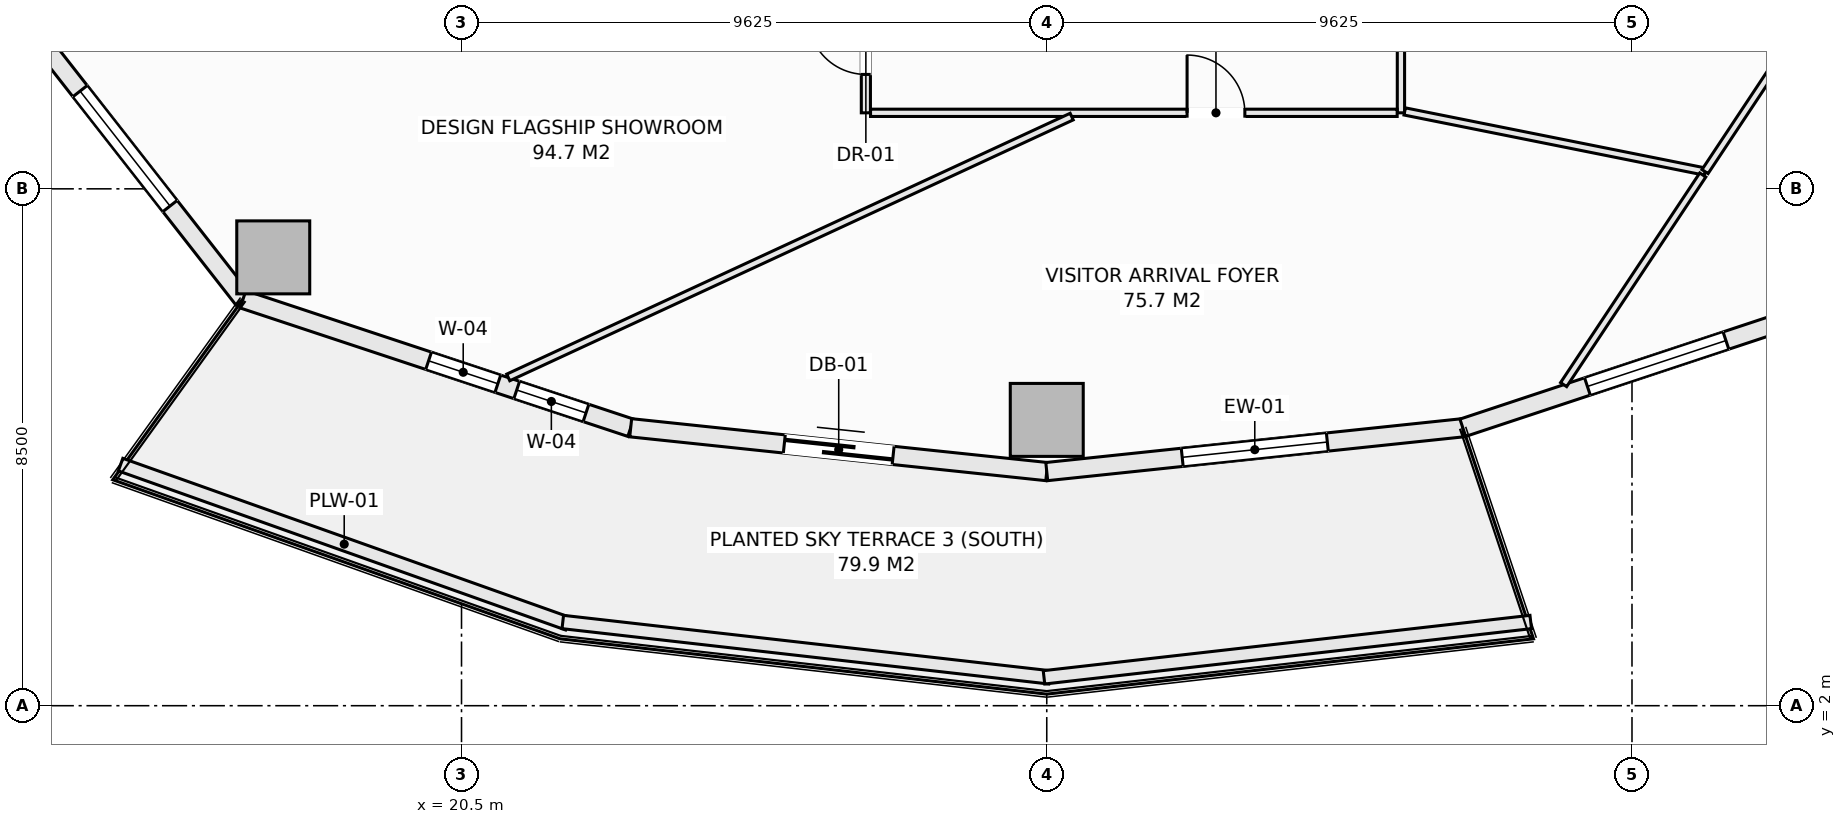
"""IFC4 building model, lengths in metres.
Left out: names, types, materials, properties, quantities, classifications, styles, units other than length and angle.
Written with IfcOpenShell. Run it as: python <this file> out.ifc"""

import sys

from ifc_helpers import new_model, si_unit, direction, frame, frame_2d, origin, origin_2d, place, context, subcontext, project, spatial, rectangle, extrude, element, fill, save


model = new_model("IFC4")
c1 = context("Model", 3, precision=1e-05, world=origin(), true_north=direction((0.0, 1.0)))
c2 = subcontext(c1, "Body", "Model", "MODEL_VIEW")
j1 = project(units=[si_unit("LENGTHUNIT", "METRE"), si_unit("PLANEANGLEUNIT", "RADIAN")], contexts=[c1])
p1 = place(None, origin())
s1 = spatial("IfcSite", under=j1, at=p1, CompositionType="ELEMENT")
p2 = place(p1, origin())
s2 = spatial("IfcBuilding", under=s1, at=p2, CompositionType="ELEMENT")
p3 = place(p2, frame((0.0, 0.0, 57.3)))
s3 = spatial("IfcBuildingStorey", under=s2, at=p3, CompositionType="ELEMENT", Elevation=57.3)
for number, where, z_axis, x_axis in (
    (1, (17.404, 9.373, -0.28), (0.0, 0.0, 1.0), (1.0, 0.0, 0.0)),
    (2, (30.125, 6.7, -0.28), (0.0, 0.0, 1.0), (1.0, 0.0, 0.0)),
):
    element("IfcColumn", number, at=place(p3, frame(where, z_axis=z_axis, x_axis=x_axis)), inside=s3, PredefinedType="COLUMN", context=c2, shape_type="SweptSolid", body=[
        extrude(rectangle(XDim=1.2, YDim=1.2, at=origin_2d()), origin(), (0.0, 0.0, 1.0), 3.85),
    ])
p4 = place(p3, frame((13.026, 13.64, 0.0), z_axis=(0.0, 0.0, 1.0), x_axis=(0.616434798832, -0.78740595552, 0.0)))
e3 = element("IfcWall", 3, at=p4, inside=s3, PredefinedType="SOLIDWALL", context=c2, shape_type="SweptSolid", body=[
    extrude(rectangle(XDim=6.294, YDim=0.3, at=frame_2d((3.147, 0.0))), origin(), (0.0, 0.0, 1.0), 3.093),
])
p5 = place(p4, frame((1.947, 0.0, 0.85)))
e4 = element("IfcOpeningElement", 4, at=p5, cuts=e3, PredefinedType="OPENING", context=c2, shape_type="SweptSolid", body=[
    extrude(rectangle(XDim=2.4, YDim=1.9, at=frame_2d((1.2, 0.95))), frame((0.0, 0.16, 0.0), z_axis=(0.0, -1.0, 0.0), x_axis=(1.0, 0.0, 0.0)), (0.0, 0.0, 1.0), 0.32),
])
p6 = place(p3, frame((16.906, 8.684, 0.0), z_axis=(0.0, 0.0, 1.0), x_axis=(0.949245153629, -0.314537181127, 0.0)))
e5 = element("IfcWall", 5, at=p6, inside=s3, PredefinedType="SOLIDWALL", context=c2, shape_type="SweptSolid", body=[
    extrude(rectangle(XDim=6.717, YDim=0.3, at=frame_2d((3.358, 0.0))), origin(), (0.0, 0.0, 1.0), 3.093),
])
p7 = place(p6, frame((3.215, 0.0, 0.85)))
e6 = element("IfcOpeningElement", 6, at=p7, cuts=e5, PredefinedType="OPENING", context=c2, shape_type="SweptSolid", body=[
    extrude(rectangle(XDim=1.2, YDim=1.9, at=frame_2d((0.6, 0.95))), frame((0.0, 0.16, 0.0), z_axis=(0.0, -1.0, 0.0), x_axis=(1.0, 0.0, 0.0)), (0.0, 0.0, 1.0), 0.32),
])
p8 = place(p6, frame((4.742, 0.0, 0.85)))
e7 = element("IfcOpeningElement", 7, at=p8, cuts=e5, PredefinedType="OPENING", context=c2, shape_type="SweptSolid", body=[
    extrude(rectangle(XDim=1.2, YDim=1.9, at=frame_2d((0.6, 0.95))), frame((0.0, 0.16, 0.0), z_axis=(0.0, -1.0, 0.0), x_axis=(1.0, 0.0, 0.0)), (0.0, 0.0, 1.0), 0.32),
])
p9 = place(p3, frame((23.282, 6.571, 0.0), z_axis=(0.0, 0.0, 1.0), x_axis=(0.994498840295, -0.104747585419, 0.0)))
e8 = element("IfcWall", 8, at=p9, inside=s3, PredefinedType="SOLIDWALL", context=c2, shape_type="SweptSolid", body=[
    extrude(rectangle(XDim=6.88, YDim=0.3, at=frame_2d((3.44, 0.0))), origin(), (0.0, 0.0, 1.0), 3.093),
])
p10 = place(p9, frame((2.54, 0.0, 0.0)))
e9 = element("IfcOpeningElement", 9, at=p10, cuts=e8, PredefinedType="OPENING", context=c2, shape_type="SweptSolid", body=[
    extrude(rectangle(XDim=1.8, YDim=2.25, at=frame_2d((0.9, 1.125))), frame((0.0, 0.16, 0.0), z_axis=(0.0, -1.0, 0.0), x_axis=(1.0, 0.0, 0.0)), (0.0, 0.0, 1.0), 0.32),
])
p11 = place(p3, frame((30.125, 5.85, 0.0), z_axis=(0.0, 0.0, 1.0), x_axis=(0.994498840295, 0.104747585419, 0.0)))
e10 = element("IfcWall", 10, at=p11, inside=s3, PredefinedType="SOLIDWALL", context=c2, shape_type="SweptSolid", body=[
    extrude(rectangle(XDim=6.88, YDim=0.3, at=frame_2d((3.44, 0.0))), origin(), (0.0, 0.0, 1.0), 3.093),
])
p12 = place(p11, frame((2.24, 0.0, 0.85)))
e11 = element("IfcOpeningElement", 11, at=p12, cuts=e10, PredefinedType="OPENING", context=c2, shape_type="SweptSolid", body=[
    extrude(rectangle(XDim=2.4, YDim=1.9, at=frame_2d((1.2, 0.95))), frame((0.0, 0.16, 0.0), z_axis=(0.0, -1.0, 0.0), x_axis=(1.0, 0.0, 0.0)), (0.0, 0.0, 1.0), 0.32),
])
p13 = place(p3, frame((36.968, 6.571, 0.0), z_axis=(0.0, 0.0, 1.0), x_axis=(0.949245153629, 0.314537181127, 0.0)))
e12 = element("IfcWall", 12, at=p13, inside=s3, PredefinedType="SOLIDWALL", context=c2, shape_type="SweptSolid", body=[
    extrude(rectangle(XDim=6.717, YDim=0.3, at=frame_2d((3.358, 0.0))), origin(), (0.0, 0.0, 1.0), 3.093),
])
p14 = place(p13, frame((2.159, 0.0, 0.85)))
e13 = element("IfcOpeningElement", 13, at=p14, cuts=e12, PredefinedType="OPENING", context=c2, shape_type="SweptSolid", body=[
    extrude(rectangle(XDim=2.4, YDim=1.9, at=frame_2d((1.2, 0.95))), frame((0.0, 0.16, 0.0), z_axis=(0.0, -1.0, 0.0), x_axis=(1.0, 0.0, 0.0)), (0.0, 0.0, 1.0), 0.32),
])
p15 = place(p3, frame((14.893, 5.965, 0.0), z_axis=(0.0, 0.0, 1.0), x_axis=(0.942203722205, -0.335040513764, 0.0)))
e14 = element("IfcWall", 14, at=p15, inside=s3, PredefinedType="PARAPET", context=c2, shape_type="SweptSolid", body=[
    extrude(rectangle(XDim=7.807, YDim=0.22, at=frame_2d((3.904, 0.0))), origin(), (0.0, 0.0, 1.0), 0.52),
])
for number, where, z_axis, x_axis in (
    (15, (22.166, 3.376, 0.0), (0.0, 0.0, 1.0), (0.994, -0.113, 0.0)),
    (16, (30.08, 2.466, 0.0), (0.0, 0.0, 1.0), (0.994, 0.113, 0.0)),
):
    element("IfcWall", number, at=place(p3, frame(where, z_axis=z_axis, x_axis=x_axis)), inside=s3, PredefinedType="PARAPET", context=c2, shape_type="SweptSolid", body=[
        extrude(rectangle(XDim=8.056, YDim=0.22, at=frame_2d((4.028, 0.0))), origin(), (0.0, 0.0, 1.0), 0.52),
    ])
p16 = place(p3, frame((27.15, 11.75, 0.0), z_axis=(0.0, 0.0, 1.0), x_axis=(0.0, 1.0, 0.0)))
e17 = element("IfcWall", 17, at=p16, inside=s3, PredefinedType="PARTITIONING", context=c2, shape_type="SweptSolid", body=[
    extrude(rectangle(XDim=5.223, YDim=0.15, at=frame_2d((2.611, 0.0))), origin(), (0.0, 0.0, 1.0), 3.57),
])
p17 = place(p16, frame((0.631, 0.0, 0.0)))
e18 = element("IfcOpeningElement", 18, at=p17, cuts=e17, PredefinedType="OPENING", context=c2, shape_type="SweptSolid", body=[
    extrude(rectangle(XDim=0.95, YDim=2.1, at=frame_2d((0.475, 1.05))), frame((0.0, 0.085, 0.0), z_axis=(0.0, -1.0, 0.0), x_axis=(1.0, 0.0, 0.0)), (0.0, 0.0, 1.0), 0.17),
])
p18 = place(p16, frame((2.828, 0.0, 0.0)))
e19 = element("IfcOpeningElement", 19, at=p18, cuts=e17, PredefinedType="OPENING", context=c2, shape_type="SweptSolid", body=[
    extrude(rectangle(XDim=0.95, YDim=2.1, at=frame_2d((0.475, 1.05))), frame((0.0, 0.085, 0.0), z_axis=(0.0, -1.0, 0.0), x_axis=(1.0, 0.0, 0.0)), (0.0, 0.0, 1.0), 0.17),
])
p19 = place(p3, frame((35.95, 11.75, 0.0), z_axis=(0.0, 0.0, 1.0), x_axis=(0.0, 1.0, 0.0)))
e20 = element("IfcWall", 20, at=p19, inside=s3, PredefinedType="PARTITIONING", context=c2, shape_type="SweptSolid", body=[
    extrude(rectangle(XDim=3.838, YDim=0.12, at=frame_2d((1.919, 0.0))), origin(), (0.0, 0.0, 1.0), 3.57),
])
p20 = place(p3, frame((27.227, 11.75, 0.0), z_axis=(0.0, 0.0, 1.0), x_axis=(1.0, 0.0, 0.0)))
e21 = element("IfcWall", 21, at=p20, inside=s3, PredefinedType="PARTITIONING", context=c2, shape_type="SweptSolid", body=[
    extrude(rectangle(XDim=8.661, YDim=0.12, at=frame_2d((4.331, 0.0))), origin(), (0.0, 0.0, 1.0), 3.57),
])
p21 = place(p20, frame((5.206, 0.0, 0.0)))
e22 = element("IfcOpeningElement", 22, at=p21, cuts=e21, PredefinedType="OPENING", context=c2, shape_type="SweptSolid", body=[
    extrude(rectangle(XDim=0.95, YDim=2.1, at=frame_2d((0.475, 1.05))), frame((0.0, 0.07, 0.0), z_axis=(0.0, -1.0, 0.0), x_axis=(1.0, 0.0, 0.0)), (0.0, 0.0, 1.0), 0.14),
])
p22 = place(p3, frame((36.012, 11.773, 0.0), z_axis=(0.0, 0.0, 1.0), x_axis=(0.980526579604, -0.196386421855, 0.0)))
e23 = element("IfcWall", 23, at=p22, inside=s3, PredefinedType="PARTITIONING", context=c2, shape_type="SweptSolid", body=[
    extrude(rectangle(XDim=5.037, YDim=0.12, at=frame_2d((2.519, 0.0))), origin(), (0.0, 0.0, 1.0), 3.57),
])
p23 = place(p3, frame((21.269, 7.398, 0.0), z_axis=(0.0, 0.0, 1.0), x_axis=(0.907478047532, 0.420099503983, 0.0)))
e24 = element("IfcWall", 24, at=p23, inside=s3, PredefinedType="PARTITIONING", context=c2, shape_type="SweptSolid", body=[
    extrude(rectangle(XDim=10.211, YDim=0.12, at=frame_2d((5.106, 0.0))), origin(), (0.0, 0.0, 1.0), 3.093),
])
p24 = place(p3, frame((38.625, 7.28, 0.0), z_axis=(0.0, 0.0, 1.0), x_axis=(0.553106233715, 0.833110733471, 0.0)))
e25 = element("IfcWall", 25, at=p24, inside=s3, PredefinedType="PARTITIONING", context=c2, shape_type="SweptSolid", body=[
    extrude(rectangle(XDim=4.138, YDim=0.12, at=frame_2d((2.069, 0.0))), origin(), (0.0, 0.0, 1.0), 3.57),
])
p25 = place(p3, frame((40.951, 10.783, 0.0), z_axis=(0.0, 0.0, 1.0), x_axis=(0.553122636923, 0.83309984307, 0.0)))
e26 = element("IfcWall", 26, at=p25, inside=s3, PredefinedType="PARTITIONING", context=c2, shape_type="SweptSolid", body=[
    extrude(rectangle(XDim=9.72, YDim=0.12, at=frame_2d((4.86, 0.0))), origin(), (0.0, 0.0, 1.0), 3.57),
])
p26 = place(p5, origin())
e27 = element("IfcWindow", 27, at=p26, inside=s3, PartitioningType="SINGLE_PANEL", PredefinedType="WINDOW", context=c2, shape_type="SweptSolid", body=[
    extrude(rectangle(XDim=2.4, YDim=1.9, at=frame_2d((1.2, 0.95))), frame((0.0, 0.03, 0.0), z_axis=(0.0, -1.0, 0.0), x_axis=(1.0, 0.0, 0.0)), (0.0, 0.0, 1.0), 0.06),
])
fill(e4, e27)
p27 = place(p7, origin())
e28 = element("IfcWindow", 28, at=p27, inside=s3, PartitioningType="SINGLE_PANEL", PredefinedType="WINDOW", context=c2, shape_type="SweptSolid", body=[
    extrude(rectangle(XDim=1.2, YDim=1.9, at=frame_2d((0.6, 0.95))), frame((0.0, 0.03, 0.0), z_axis=(0.0, -1.0, 0.0), x_axis=(1.0, 0.0, 0.0)), (0.0, 0.0, 1.0), 0.06),
])
fill(e6, e28)
p28 = place(p10, frame((1.8, 0.0, 0.0), z_axis=(0.0, 0.0, 1.0), x_axis=(-1.0, 0.0, 0.0)))
e29 = element("IfcDoor", 29, at=p28, inside=s3, OperationType="SLIDING_TO_LEFT", PredefinedType="DOOR", context=c2, shape_type="SweptSolid", body=[
    extrude(rectangle(XDim=1.8, YDim=2.25, at=frame_2d((0.9, 1.125))), frame((0.0, 0.025, 0.0), z_axis=(0.0, -1.0, 0.0), x_axis=(1.0, 0.0, 0.0)), (0.0, 0.0, 1.0), 0.05),
])
fill(e9, e29)
p29 = place(p12, origin())
e30 = element("IfcWindow", 30, at=p29, inside=s3, PartitioningType="SINGLE_PANEL", PredefinedType="WINDOW", context=c2, shape_type="SweptSolid", body=[
    extrude(rectangle(XDim=2.4, YDim=1.9, at=frame_2d((1.2, 0.95))), frame((0.0, 0.03, 0.0), z_axis=(0.0, -1.0, 0.0), x_axis=(1.0, 0.0, 0.0)), (0.0, 0.0, 1.0), 0.06),
])
fill(e11, e30)
p30 = place(p14, origin())
e31 = element("IfcWindow", 31, at=p30, inside=s3, PartitioningType="SINGLE_PANEL", PredefinedType="WINDOW", context=c2, shape_type="SweptSolid", body=[
    extrude(rectangle(XDim=2.4, YDim=1.9, at=frame_2d((1.2, 0.95))), frame((0.0, 0.03, 0.0), z_axis=(0.0, -1.0, 0.0), x_axis=(1.0, 0.0, 0.0)), (0.0, 0.0, 1.0), 0.06),
])
fill(e13, e31)
p31 = place(p17, origin())
e32 = element("IfcDoor", 32, at=p31, inside=s3, OperationType="SINGLE_SWING_RIGHT", PredefinedType="DOOR", context=c2, shape_type="SweptSolid", body=[
    extrude(rectangle(XDim=0.95, YDim=2.1, at=frame_2d((0.475, 1.05))), frame((0.0, 0.025, 0.0), z_axis=(0.0, -1.0, 0.0), x_axis=(1.0, 0.0, 0.0)), (0.0, 0.0, 1.0), 0.05),
])
fill(e18, e32)
p32 = place(p21, origin())
e33 = element("IfcDoor", 33, at=p32, inside=s3, OperationType="SINGLE_SWING_LEFT", PredefinedType="DOOR", context=c2, shape_type="SweptSolid", body=[
    extrude(rectangle(XDim=0.95, YDim=2.1, at=frame_2d((0.475, 1.05))), frame((0.0, 0.025, 0.0), z_axis=(0.0, -1.0, 0.0), x_axis=(1.0, 0.0, 0.0)), (0.0, 0.0, 1.0), 0.05),
])
fill(e22, e33)
p33 = place(p8, origin())
e34 = element("IfcWindow", 34, at=p33, inside=s3, PartitioningType="SINGLE_PANEL", PredefinedType="WINDOW", context=c2, shape_type="SweptSolid", body=[
    extrude(rectangle(XDim=1.2, YDim=1.9, at=frame_2d((0.6, 0.95))), frame((0.0, 0.03, 0.0), z_axis=(0.0, -1.0, 0.0), x_axis=(1.0, 0.0, 0.0)), (0.0, 0.0, 1.0), 0.06),
])
fill(e7, e34)
save(model, sys.argv[1])
